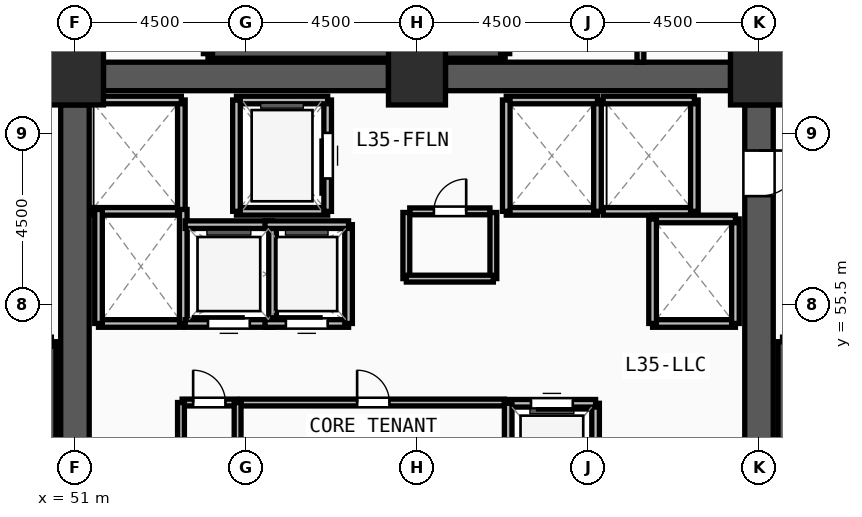
"""IFC4 building model, lengths in metres.
Left out: names, types, materials, properties, quantities, classifications, styles, units other than length and angle.
Written with IfcOpenShell. Run it as: python <this file> out.ifc"""

import sys

from ifc_helpers import new_model, si_unit, direction, frame, frame_2d, origin, origin_2d, place, context, subcontext, project, spatial, rectangle, extrude, source, transform, mapped, element, fill, save


model = new_model("IFC4")
c1 = context("Model", 3, precision=1e-05, world=origin(), true_north=direction((0.0, 1.0)))
c2 = subcontext(c1, "Body", "Model", "MODEL_VIEW")
j1 = project(units=[si_unit("LENGTHUNIT", "METRE"), si_unit("PLANEANGLEUNIT", "RADIAN")], contexts=[c1])
p1 = place(None, origin())
s1 = spatial("IfcSite", under=j1, at=p1, CompositionType="ELEMENT")
p2 = place(p1, origin())
s2 = spatial("IfcBuilding", under=s1, at=p2, CompositionType="ELEMENT")
p3 = place(p2, frame((0.0, 0.0, 135.75)))
s3 = spatial("IfcBuildingStorey", under=s2, at=p3, CompositionType="ELEMENT", Elevation=135.75)
m1 = source(origin(), c2, "Body", "SweptSolid", [
    extrude(rectangle(XDim=1.5, YDim=1.5, at=origin_2d()), origin(), (0.0, 0.0, 1.0), 3.75),
])
for number, where, z_axis, x_axis in (
    (1, (69.0, 61.5, 0.0), (0.0, 0.0, 1.0), (1.0, 0.0, 0.0)),
    (2, (60.0, 61.5, 0.0), (0.0, 0.0, 1.0), (1.0, 0.0, 0.0)),
    (3, (51.0, 61.5, 0.0), (0.0, 0.0, 1.0), (1.0, 0.0, 0.0)),
):
    element("IfcColumn", number, at=place(p3, frame(where, z_axis=z_axis, x_axis=x_axis)), inside=s3, PredefinedType="COLUMN", context=c2, shape_type="MappedRepresentation", body=[
        mapped(m1, transform((0.0, 0.0, 0.0), x_axis=(1.0, 0.0, 0.0), y_axis=(0.0, 1.0, 0.0), z_axis=(0.0, 0.0, 1.0), scale=1.0)),
    ])
for number, where, z_axis, x_axis in (
    (4, (51.75, 61.5, 0.0), (0.0, 0.0, 1.0), (1.0, 0.0, 0.0)),
    (5, (60.75, 61.5, 0.0), (0.0, 0.0, 1.0), (1.0, 0.0, 0.0)),
):
    element("IfcWall", number, at=place(p3, frame(where, z_axis=z_axis, x_axis=x_axis)), inside=s3, PredefinedType="SHEAR", context=c2, shape_type="SweptSolid", body=[
        extrude(rectangle(XDim=7.5, YDim=0.75, at=frame_2d((3.75, 0.0))), origin(), (0.0, 0.0, 1.0), 3.47),
    ])
p4 = place(p3, frame((69.0, 60.75, 0.0), z_axis=(0.0, 0.0, 1.0), x_axis=(0.0, -1.0, 0.0)))
e6 = element("IfcWall", 6, at=p4, inside=s3, PredefinedType="SHEAR", context=c2, shape_type="SweptSolid", body=[
    extrude(rectangle(XDim=13.5, YDim=0.75, at=frame_2d((6.75, 0.0))), origin(), (0.0, 0.0, 1.0), 3.47),
])
m2 = source(origin(), c2, "Body", "SweptSolid", [
    extrude(rectangle(XDim=1.2, YDim=2.2, at=frame_2d((0.6, 1.1))), frame((0.0, 0.385, 0.0), z_axis=(0.0, -1.0, 0.0), x_axis=(1.0, 0.0, 0.0)), (0.0, 0.0, 1.0), 0.77),
])
p5 = place(p4, frame((1.2, 0.0, 0.0)))
e7 = element("IfcOpeningElement", 7, at=p5, cuts=e6, PredefinedType="OPENING", context=c2, shape_type="MappedRepresentation", body=[
    mapped(m2, transform((0.0, 0.0, 0.0), x_axis=(1.0, 0.0, 0.0), y_axis=(0.0, 1.0, 0.0), z_axis=(0.0, 0.0, 1.0), scale=1.0)),
])
p6 = place(p3, frame((51.0, 47.25, 0.0), z_axis=(0.0, 0.0, 1.0), x_axis=(0.0, 1.0, 0.0)))
e8 = element("IfcWall", 8, at=p6, inside=s3, PredefinedType="SHEAR", context=c2, shape_type="SweptSolid", body=[
    extrude(rectangle(XDim=13.5, YDim=0.75, at=frame_2d((6.75, 0.0))), origin(), (0.0, 0.0, 1.0), 3.47),
])
for number, where, z_axis, x_axis in (
    (9, (50.38, 46.7, 0.0), (0.0, 0.0, 1.0), (0.0, 1.0, 0.0)),
    (10, (69.62, 54.52, 0.0), (0.0, 0.0, 1.0), (0.0, -1.0, 0.0)),
    (11, (54.5, 62.1, 0.0), (0.0, 0.0, 1.0), (1.0, 0.0, 0.0)),
):
    element("IfcWall", number, at=place(p3, frame(where, z_axis=z_axis, x_axis=x_axis)), inside=s3, PredefinedType="SOLIDWALL", context=c2, shape_type="SweptSolid", body=[
        extrude(rectangle(XDim=7.82, YDim=0.24, at=frame_2d((3.91, 0.0))), origin(), (0.0, 0.0, 1.0), 3.47),
    ])
for number, where, z_axis, x_axis in (
    (12, (62.32, 62.1, 0.0), (0.0, 0.0, 1.0), (0.0, 1.0, 0.0)),
    (13, (54.5, 65.54, 0.0), (0.0, 0.0, 1.0), (0.0, -1.0, 0.0)),
):
    element("IfcWall", number, at=place(p3, frame(where, z_axis=z_axis, x_axis=x_axis)), inside=s3, PredefinedType="SOLIDWALL", context=c2, shape_type="SweptSolid", body=[
        extrude(rectangle(XDim=3.44, YDim=0.24, at=frame_2d((1.72, 0.0))), origin(), (0.0, 0.0, 1.0), 3.47),
    ])
p7 = place(p3, frame((55.25, 57.95, 0.0), z_axis=(0.0, 0.0, 1.0), x_axis=(1.0, 0.0, 0.0)))
e14 = element("IfcWall", 14, at=p7, inside=s3, PredefinedType="SOLIDWALL", context=c2, shape_type="SweptSolid", body=[
    extrude(rectangle(XDim=2.4, YDim=0.2, at=frame_2d((1.2, 0.0))), origin(), (0.0, 0.0, 1.0), 3.47),
])
p8 = place(p3, frame((57.65, 57.95, 0.0), z_axis=(0.0, 0.0, 1.0), x_axis=(0.0, 1.0, 0.0)))
e15 = element("IfcWall", 15, at=p8, inside=s3, PredefinedType="SOLIDWALL", context=c2, shape_type="SweptSolid", body=[
    extrude(rectangle(XDim=2.93, YDim=0.2, at=frame_2d((1.465, 0.0))), origin(), (0.0, 0.0, 1.0), 3.47),
])
m3 = source(origin(), c2, "Body", "SweptSolid", [
    extrude(rectangle(XDim=1.2, YDim=2.3, at=frame_2d((0.6, 1.15))), frame((0.0, 0.11, 0.0), z_axis=(0.0, -1.0, 0.0), x_axis=(1.0, 0.0, 0.0)), (0.0, 0.0, 1.0), 0.22),
])
p9 = place(p8, frame((0.865, 0.0, 0.0)))
e16 = element("IfcOpeningElement", 16, at=p9, cuts=e15, PredefinedType="OPENING", context=c2, shape_type="MappedRepresentation", body=[
    mapped(m3, transform((0.0, 0.0, 0.0), x_axis=(1.0, 0.0, 0.0), y_axis=(0.0, 1.0, 0.0), z_axis=(0.0, 0.0, 1.0), scale=1.0)),
])
p10 = place(p3, frame((57.65, 60.88, 0.0), z_axis=(0.0, 0.0, 1.0), x_axis=(-1.0, 0.0, 0.0)))
e17 = element("IfcWall", 17, at=p10, inside=s3, PredefinedType="SOLIDWALL", context=c2, shape_type="SweptSolid", body=[
    extrude(rectangle(XDim=2.4, YDim=0.2, at=frame_2d((1.2, 0.0))), origin(), (0.0, 0.0, 1.0), 3.47),
])
p11 = place(p3, frame((55.25, 60.88, 0.0), z_axis=(0.0, 0.0, 1.0), x_axis=(0.0, -1.0, 0.0)))
e18 = element("IfcWall", 18, at=p11, inside=s3, PredefinedType="SOLIDWALL", context=c2, shape_type="SweptSolid", body=[
    extrude(rectangle(XDim=2.93, YDim=0.2, at=frame_2d((1.465, 0.0))), origin(), (0.0, 0.0, 1.0), 3.47),
])
p12 = place(p3, frame((62.35, 57.95, 0.0), z_axis=(0.0, 0.0, 1.0), x_axis=(1.0, 0.0, 0.0)))
e19 = element("IfcWall", 19, at=p12, inside=s3, PredefinedType="SOLIDWALL", context=c2, shape_type="SweptSolid", body=[
    extrude(rectangle(XDim=2.4, YDim=0.2, at=frame_2d((1.2, 0.0))), origin(), (0.0, 0.0, 1.0), 3.47),
])
p13 = place(p3, frame((64.75, 57.95, 0.0), z_axis=(0.0, 0.0, 1.0), x_axis=(0.0, 1.0, 0.0)))
e20 = element("IfcWall", 20, at=p13, inside=s3, PredefinedType="SOLIDWALL", context=c2, shape_type="SweptSolid", body=[
    extrude(rectangle(XDim=2.93, YDim=0.2, at=frame_2d((1.465, 0.0))), origin(), (0.0, 0.0, 1.0), 3.47),
])
p14 = place(p3, frame((64.75, 60.88, 0.0), z_axis=(0.0, 0.0, 1.0), x_axis=(-1.0, 0.0, 0.0)))
e21 = element("IfcWall", 21, at=p14, inside=s3, PredefinedType="SOLIDWALL", context=c2, shape_type="SweptSolid", body=[
    extrude(rectangle(XDim=2.4, YDim=0.2, at=frame_2d((1.2, 0.0))), origin(), (0.0, 0.0, 1.0), 3.47),
])
p15 = place(p3, frame((62.35, 60.88, 0.0), z_axis=(0.0, 0.0, 1.0), x_axis=(0.0, -1.0, 0.0)))
e22 = element("IfcWall", 22, at=p15, inside=s3, PredefinedType="SOLIDWALL", context=c2, shape_type="SweptSolid", body=[
    extrude(rectangle(XDim=2.93, YDim=0.2, at=frame_2d((1.465, 0.0))), origin(), (0.0, 0.0, 1.0), 3.47),
])
p16 = place(p3, frame((64.9, 57.95, 0.0), z_axis=(0.0, 0.0, 1.0), x_axis=(1.0, 0.0, 0.0)))
e23 = element("IfcWall", 23, at=p16, inside=s3, PredefinedType="SOLIDWALL", context=c2, shape_type="SweptSolid", body=[
    extrude(rectangle(XDim=2.4, YDim=0.2, at=frame_2d((1.2, 0.0))), origin(), (0.0, 0.0, 1.0), 3.47),
])
p17 = place(p3, frame((67.3, 57.95, 0.0), z_axis=(0.0, 0.0, 1.0), x_axis=(0.0, 1.0, 0.0)))
e24 = element("IfcWall", 24, at=p17, inside=s3, PredefinedType="SOLIDWALL", context=c2, shape_type="SweptSolid", body=[
    extrude(rectangle(XDim=2.93, YDim=0.2, at=frame_2d((1.465, 0.0))), origin(), (0.0, 0.0, 1.0), 3.47),
])
for number, where, z_axis, x_axis in (
    (25, (67.3, 60.88, 0.0), (0.0, 0.0, 1.0), (-1.0, 0.0, 0.0)),
    (26, (51.4, 57.95, 0.0), (0.0, 0.0, 1.0), (1.0, 0.0, 0.0)),
):
    element("IfcWall", number, at=place(p3, frame(where, z_axis=z_axis, x_axis=x_axis)), inside=s3, PredefinedType="SOLIDWALL", context=c2, shape_type="SweptSolid", body=[
        extrude(rectangle(XDim=2.4, YDim=0.2, at=frame_2d((1.2, 0.0))), origin(), (0.0, 0.0, 1.0), 3.47),
    ])
p18 = place(p3, frame((53.8, 57.95, 0.0), z_axis=(0.0, 0.0, 1.0), x_axis=(0.0, 1.0, 0.0)))
e27 = element("IfcWall", 27, at=p18, inside=s3, PredefinedType="SOLIDWALL", context=c2, shape_type="SweptSolid", body=[
    extrude(rectangle(XDim=2.93, YDim=0.2, at=frame_2d((1.465, 0.0))), origin(), (0.0, 0.0, 1.0), 3.47),
])
p19 = place(p3, frame((53.8, 60.88, 0.0), z_axis=(0.0, 0.0, 1.0), x_axis=(-1.0, 0.0, 0.0)))
e28 = element("IfcWall", 28, at=p19, inside=s3, PredefinedType="SOLIDWALL", context=c2, shape_type="SweptSolid", body=[
    extrude(rectangle(XDim=2.4, YDim=0.2, at=frame_2d((1.2, 0.0))), origin(), (0.0, 0.0, 1.0), 3.47),
])
p20 = place(p3, frame((51.62, 55.0, 0.0), z_axis=(0.0, 0.0, 1.0), x_axis=(1.0, 0.0, 0.0)))
e29 = element("IfcWall", 29, at=p20, inside=s3, PredefinedType="SOLIDWALL", context=c2, shape_type="SweptSolid", body=[
    extrude(rectangle(XDim=2.23, YDim=0.2, at=frame_2d((1.115, 0.0))), origin(), (0.0, 0.0, 1.0), 3.47),
])
for number, where, z_axis, x_axis in (
    (30, (53.85, 55.0, 0.0), (0.0, 0.0, 1.0), (0.0, 1.0, 0.0)),
    (31, (51.62, 58.0, 0.0), (0.0, 0.0, 1.0), (0.0, -1.0, 0.0)),
):
    element("IfcWall", number, at=place(p3, frame(where, z_axis=z_axis, x_axis=x_axis)), inside=s3, PredefinedType="SOLIDWALL", context=c2, shape_type="SweptSolid", body=[
        extrude(rectangle(XDim=3.0, YDim=0.2, at=frame_2d((1.5, 0.0))), origin(), (0.0, 0.0, 1.0), 3.47),
    ])
p21 = place(p3, frame((66.2, 55.0, 0.0), z_axis=(0.0, 0.0, 1.0), x_axis=(1.0, 0.0, 0.0)))
e32 = element("IfcWall", 32, at=p21, inside=s3, PredefinedType="SOLIDWALL", context=c2, shape_type="SweptSolid", body=[
    extrude(rectangle(XDim=2.18, YDim=0.2, at=frame_2d((1.09, 0.0))), origin(), (0.0, 0.0, 1.0), 3.47),
])
p22 = place(p3, frame((68.38, 55.0, 0.0), z_axis=(0.0, 0.0, 1.0), x_axis=(0.0, 1.0, 0.0)))
e33 = element("IfcWall", 33, at=p22, inside=s3, PredefinedType="SOLIDWALL", context=c2, shape_type="SweptSolid", body=[
    extrude(rectangle(XDim=2.75, YDim=0.2, at=frame_2d((1.375, 0.0))), origin(), (0.0, 0.0, 1.0), 3.47),
])
p23 = place(p3, frame((68.38, 57.75, 0.0), z_axis=(0.0, 0.0, 1.0), x_axis=(-1.0, 0.0, 0.0)))
e34 = element("IfcWall", 34, at=p23, inside=s3, PredefinedType="SOLIDWALL", context=c2, shape_type="SweptSolid", body=[
    extrude(rectangle(XDim=2.18, YDim=0.2, at=frame_2d((1.09, 0.0))), origin(), (0.0, 0.0, 1.0), 3.47),
])
p24 = place(p3, frame((66.2, 57.75, 0.0), z_axis=(0.0, 0.0, 1.0), x_axis=(0.0, -1.0, 0.0)))
e35 = element("IfcWall", 35, at=p24, inside=s3, PredefinedType="SOLIDWALL", context=c2, shape_type="SweptSolid", body=[
    extrude(rectangle(XDim=2.75, YDim=0.2, at=frame_2d((1.375, 0.0))), origin(), (0.0, 0.0, 1.0), 3.47),
])
p25 = place(p3, frame((64.7, 50.3, 0.0), z_axis=(0.0, 0.0, 1.0), x_axis=(0.0, 1.0, 0.0)))
e36 = element("IfcWall", 36, at=p25, inside=s3, PredefinedType="SOLIDWALL", context=c2, shape_type="SweptSolid", body=[
    extrude(rectangle(XDim=2.6, YDim=0.2, at=frame_2d((1.3, 0.0))), origin(), (0.0, 0.0, 1.0), 3.47),
])
p26 = place(p3, frame((64.7, 52.9, 0.0), z_axis=(0.0, 0.0, 1.0), x_axis=(-1.0, 0.0, 0.0)))
e37 = element("IfcWall", 37, at=p26, inside=s3, PredefinedType="SOLIDWALL", context=c2, shape_type="SweptSolid", body=[
    extrude(rectangle(XDim=2.3, YDim=0.2, at=frame_2d((1.15, 0.0))), origin(), (0.0, 0.0, 1.0), 3.47),
])
m4 = source(origin(), c2, "Body", "SweptSolid", [
    extrude(rectangle(XDim=1.1, YDim=2.2, at=frame_2d((0.55, 1.1))), frame((0.0, 0.11, 0.0), z_axis=(0.0, -1.0, 0.0), x_axis=(1.0, 0.0, 0.0)), (0.0, 0.0, 1.0), 0.22),
])
p27 = place(p26, frame((0.6, 0.0, 0.0)))
e38 = element("IfcOpeningElement", 38, at=p27, cuts=e37, PredefinedType="OPENING", context=c2, shape_type="MappedRepresentation", body=[
    mapped(m4, transform((0.0, 0.0, 0.0), x_axis=(1.0, 0.0, 0.0), y_axis=(0.0, 1.0, 0.0), z_axis=(0.0, 0.0, 1.0), scale=1.0)),
])
p28 = place(p3, frame((62.4, 52.9, 0.0), z_axis=(0.0, 0.0, 1.0), x_axis=(0.0, -1.0, 0.0)))
e39 = element("IfcWall", 39, at=p28, inside=s3, PredefinedType="SOLIDWALL", context=c2, shape_type="SweptSolid", body=[
    extrude(rectangle(XDim=2.6, YDim=0.2, at=frame_2d((1.3, 0.0))), origin(), (0.0, 0.0, 1.0), 3.47),
])
p29 = place(p3, frame((53.9, 55.0, 0.0), z_axis=(0.0, 0.0, 1.0), x_axis=(1.0, 0.0, 0.0)))
e40 = element("IfcWall", 40, at=p29, inside=s3, PredefinedType="SOLIDWALL", context=c2, shape_type="SweptSolid", body=[
    extrude(rectangle(XDim=2.3, YDim=0.2, at=frame_2d((1.15, 0.0))), origin(), (0.0, 0.0, 1.0), 3.47),
])
p30 = place(p29, frame((0.6, 0.0, 0.0)))
e41 = element("IfcOpeningElement", 41, at=p30, cuts=e40, PredefinedType="OPENING", context=c2, shape_type="MappedRepresentation", body=[
    mapped(m4, transform((0.0, 0.0, 0.0), x_axis=(1.0, 0.0, 0.0), y_axis=(0.0, 1.0, 0.0), z_axis=(0.0, 0.0, 1.0), scale=1.0)),
])
p31 = place(p3, frame((56.2, 55.0, 0.0), z_axis=(0.0, 0.0, 1.0), x_axis=(0.0, 1.0, 0.0)))
e42 = element("IfcWall", 42, at=p31, inside=s3, PredefinedType="SOLIDWALL", context=c2, shape_type="SweptSolid", body=[
    extrude(rectangle(XDim=2.6, YDim=0.2, at=frame_2d((1.3, 0.0))), origin(), (0.0, 0.0, 1.0), 3.47),
])
p32 = place(p3, frame((56.2, 57.6, 0.0), z_axis=(0.0, 0.0, 1.0), x_axis=(-1.0, 0.0, 0.0)))
e43 = element("IfcWall", 43, at=p32, inside=s3, PredefinedType="SOLIDWALL", context=c2, shape_type="SweptSolid", body=[
    extrude(rectangle(XDim=2.3, YDim=0.2, at=frame_2d((1.15, 0.0))), origin(), (0.0, 0.0, 1.0), 3.47),
])
p33 = place(p3, frame((56.0, 55.0, 0.0), z_axis=(0.0, 0.0, 1.0), x_axis=(1.0, 0.0, 0.0)))
e44 = element("IfcWall", 44, at=p33, inside=s3, PredefinedType="SOLIDWALL", context=c2, shape_type="SweptSolid", body=[
    extrude(rectangle(XDim=2.2, YDim=0.2, at=frame_2d((1.1, 0.0))), origin(), (0.0, 0.0, 1.0), 3.47),
])
p34 = place(p33, frame((0.55, 0.0, 0.0)))
e45 = element("IfcOpeningElement", 45, at=p34, cuts=e44, PredefinedType="OPENING", context=c2, shape_type="MappedRepresentation", body=[
    mapped(m4, transform((0.0, 0.0, 0.0), x_axis=(1.0, 0.0, 0.0), y_axis=(0.0, 1.0, 0.0), z_axis=(0.0, 0.0, 1.0), scale=1.0)),
])
p35 = place(p3, frame((58.2, 55.0, 0.0), z_axis=(0.0, 0.0, 1.0), x_axis=(0.0, 1.0, 0.0)))
e46 = element("IfcWall", 46, at=p35, inside=s3, PredefinedType="SOLIDWALL", context=c2, shape_type="SweptSolid", body=[
    extrude(rectangle(XDim=2.6, YDim=0.2, at=frame_2d((1.3, 0.0))), origin(), (0.0, 0.0, 1.0), 3.47),
])
p36 = place(p3, frame((58.2, 57.6, 0.0), z_axis=(0.0, 0.0, 1.0), x_axis=(-1.0, 0.0, 0.0)))
e47 = element("IfcWall", 47, at=p36, inside=s3, PredefinedType="SOLIDWALL", context=c2, shape_type="SweptSolid", body=[
    extrude(rectangle(XDim=2.2, YDim=0.2, at=frame_2d((1.1, 0.0))), origin(), (0.0, 0.0, 1.0), 3.47),
])
p37 = place(p3, frame((55.37, 52.92, 0.0), z_axis=(0.0, 0.0, 1.0), x_axis=(1.0, 0.0, 0.0)))
e48 = element("IfcWall", 48, at=p37, inside=s3, PredefinedType="PARTITIONING", context=c2, shape_type="SweptSolid", body=[
    extrude(rectangle(XDim=6.93, YDim=0.18, at=frame_2d((3.465, 0.0))), origin(), (0.0, 0.0, 1.0), 3.47),
])
m5 = source(origin(), c2, "Body", "SweptSolid", [
    extrude(rectangle(XDim=0.85, YDim=2.1, at=frame_2d((0.425, 1.05))), frame((0.0, 0.1, 0.0), z_axis=(0.0, -1.0, 0.0), x_axis=(1.0, 0.0, 0.0)), (0.0, 0.0, 1.0), 0.2),
])
p38 = place(p37, frame((3.055, 0.0, 0.0)))
e49 = element("IfcOpeningElement", 49, at=p38, cuts=e48, PredefinedType="OPENING", context=c2, shape_type="MappedRepresentation", body=[
    mapped(m5, transform((0.0, 0.0, 0.0), x_axis=(1.0, 0.0, 0.0), y_axis=(0.0, 1.0, 0.0), z_axis=(0.0, 0.0, 1.0), scale=1.0)),
])
p39 = place(p3, frame((59.81, 57.95, 0.0), z_axis=(0.0, 0.0, 1.0), x_axis=(1.0, 0.0, 0.0)))
e50 = element("IfcWall", 50, at=p39, inside=s3, PredefinedType="PARTITIONING", context=c2, shape_type="SweptSolid", body=[
    extrude(rectangle(XDim=2.11, YDim=0.18, at=frame_2d((1.055, 0.0))), origin(), (0.0, 0.0, 1.0), 3.47),
])
p40 = place(p39, frame((0.635, 0.0, 0.0)))
e51 = element("IfcOpeningElement", 51, at=p40, cuts=e50, PredefinedType="OPENING", context=c2, shape_type="MappedRepresentation", body=[
    mapped(m5, transform((0.0, 0.0, 0.0), x_axis=(1.0, 0.0, 0.0), y_axis=(0.0, 1.0, 0.0), z_axis=(0.0, 0.0, 1.0), scale=1.0)),
])
p41 = place(p3, frame((53.82, 52.92, 0.0), z_axis=(0.0, 0.0, 1.0), x_axis=(1.0, 0.0, 0.0)))
e52 = element("IfcWall", 52, at=p41, inside=s3, PredefinedType="PARTITIONING", context=c2, shape_type="SweptSolid", body=[
    extrude(rectangle(XDim=1.43, YDim=0.18, at=frame_2d((0.715, 0.0))), origin(), (0.0, 0.0, 1.0), 3.47),
])
p42 = place(p41, frame((0.29, 0.0, 0.0)))
e53 = element("IfcOpeningElement", 53, at=p42, cuts=e52, PredefinedType="OPENING", context=c2, shape_type="MappedRepresentation", body=[
    mapped(m5, transform((0.0, 0.0, 0.0), x_axis=(1.0, 0.0, 0.0), y_axis=(0.0, 1.0, 0.0), z_axis=(0.0, 0.0, 1.0), scale=1.0)),
])
for number, where, z_axis, x_axis in (
    (54, (59.72, 56.18, 0.0), (0.0, 0.0, 1.0), (0.0, 1.0, 0.0)),
    (55, (62.01, 56.18, 0.0), (0.0, 0.0, 1.0), (0.0, 1.0, 0.0)),
):
    element("IfcWall", number, at=place(p3, frame(where, z_axis=z_axis, x_axis=x_axis)), inside=s3, PredefinedType="PARTITIONING", context=c2, shape_type="SweptSolid", body=[
        extrude(rectangle(XDim=1.74, YDim=0.18, at=frame_2d((0.87, 0.0))), origin(), (0.0, 0.0, 1.0), 3.47),
    ])
p43 = place(p3, frame((59.72, 56.18, 0.0), z_axis=(0.0, 0.0, 1.0), x_axis=(1.0, 0.0, 0.0)))
e56 = element("IfcWall", 56, at=p43, inside=s3, PredefinedType="PARTITIONING", context=c2, shape_type="SweptSolid", body=[
    extrude(rectangle(XDim=2.29, YDim=0.18, at=frame_2d((1.145, 0.0))), origin(), (0.0, 0.0, 1.0), 3.47),
])
for number, where, z_axis, x_axis in (
    (57, (53.79, 50.35, 0.0), (0.0, 0.0, 1.0), (0.0, 1.0, 0.0)),
    (58, (55.28, 50.35, 0.0), (0.0, 0.0, 1.0), (0.0, 1.0, 0.0)),
):
    element("IfcWall", number, at=place(p3, frame(where, z_axis=z_axis, x_axis=x_axis)), inside=s3, PredefinedType="PARTITIONING", context=c2, shape_type="SweptSolid", body=[
        extrude(rectangle(XDim=2.57, YDim=0.18, at=frame_2d((1.285, 0.0))), origin(), (0.0, 0.0, 1.0), 3.47),
    ])
p44 = place(p3, frame((65.88, 61.875, 0.0), z_axis=(0.0, 0.0, 1.0), x_axis=(0.0, 1.0, 0.0)))
e59 = element("IfcWall", 59, at=p44, inside=s3, PredefinedType="PARTITIONING", context=c2, shape_type="SweptSolid", body=[
    extrude(rectangle(XDim=3.705, YDim=0.18, at=frame_2d((1.853, 0.0))), origin(), (0.0, 0.0, 1.0), 3.47),
])
p45 = place(p3, frame((69.46, 61.95, 0.0), z_axis=(0.0, 0.0, 1.0), x_axis=(0.0, 1.0, 0.0)))
e60 = element("IfcWall", 60, at=p45, inside=s3, PredefinedType="PARTITIONING", context=c2, shape_type="SweptSolid", body=[
    extrude(rectangle(XDim=3.63, YDim=0.18, at=frame_2d((1.815, 0.0))), origin(), (0.0, 0.0, 1.0), 3.47),
])
m6 = source(origin(), c2, "Body", "SweptSolid", [
    extrude(rectangle(XDim=1.2, YDim=2.2, at=frame_2d((0.6, 1.1))), frame((0.0, 0.025, 0.0), z_axis=(0.0, -1.0, 0.0), x_axis=(1.0, 0.0, 0.0)), (0.0, 0.0, 1.0), 0.05),
])
p46 = place(p5, origin())
e61 = element("IfcDoor", 61, at=p46, inside=s3, OperationType="SINGLE_SWING_LEFT", PredefinedType="DOOR", context=c2, shape_type="MappedRepresentation", body=[
    mapped(m6, transform((0.0, 0.0, 0.0), x_axis=(1.0, 0.0, 0.0), y_axis=(0.0, 1.0, 0.0), z_axis=(0.0, 0.0, 1.0), scale=1.0)),
])
fill(e7, e61)
m7 = source(origin(), c2, "Body", "SweptSolid", [
    extrude(rectangle(XDim=1.2, YDim=2.3, at=frame_2d((0.6, 1.15))), frame((0.0, 0.025, 0.0), z_axis=(0.0, -1.0, 0.0), x_axis=(1.0, 0.0, 0.0)), (0.0, 0.0, 1.0), 0.05),
])
p47 = place(p9, origin())
e62 = element("IfcDoor", 62, at=p47, inside=s3, OperationType="SLIDING_TO_LEFT", PredefinedType="DOOR", context=c2, shape_type="MappedRepresentation", body=[
    mapped(m7, transform((0.0, 0.0, 0.0), x_axis=(1.0, 0.0, 0.0), y_axis=(0.0, 1.0, 0.0), z_axis=(0.0, 0.0, 1.0), scale=1.0)),
])
fill(e16, e62)
m8 = source(origin(), c2, "Body", "SweptSolid", [
    extrude(rectangle(XDim=1.1, YDim=2.2, at=frame_2d((0.55, 1.1))), frame((0.0, 0.025, 0.0), z_axis=(0.0, -1.0, 0.0), x_axis=(1.0, 0.0, 0.0)), (0.0, 0.0, 1.0), 0.05),
])
p48 = place(p27, origin())
e63 = element("IfcDoor", 63, at=p48, inside=s3, OperationType="SLIDING_TO_LEFT", PredefinedType="DOOR", context=c2, shape_type="MappedRepresentation", body=[
    mapped(m8, transform((0.0, 0.0, 0.0), x_axis=(1.0, 0.0, 0.0), y_axis=(0.0, 1.0, 0.0), z_axis=(0.0, 0.0, 1.0), scale=1.0)),
])
fill(e38, e63)
p49 = place(p30, origin())
e64 = element("IfcDoor", 64, at=p49, inside=s3, OperationType="SLIDING_TO_LEFT", PredefinedType="DOOR", context=c2, shape_type="MappedRepresentation", body=[
    mapped(m8, transform((0.0, 0.0, 0.0), x_axis=(1.0, 0.0, 0.0), y_axis=(0.0, 1.0, 0.0), z_axis=(0.0, 0.0, 1.0), scale=1.0)),
])
fill(e41, e64)
p50 = place(p34, origin())
e65 = element("IfcDoor", 65, at=p50, inside=s3, OperationType="SLIDING_TO_LEFT", PredefinedType="DOOR", context=c2, shape_type="MappedRepresentation", body=[
    mapped(m8, transform((0.0, 0.0, 0.0), x_axis=(1.0, 0.0, 0.0), y_axis=(0.0, 1.0, 0.0), z_axis=(0.0, 0.0, 1.0), scale=1.0)),
])
fill(e45, e65)
m9 = source(origin(), c2, "Body", "SweptSolid", [
    extrude(rectangle(XDim=0.85, YDim=2.1, at=frame_2d((0.425, 1.05))), frame((0.0, 0.025, 0.0), z_axis=(0.0, -1.0, 0.0), x_axis=(1.0, 0.0, 0.0)), (0.0, 0.0, 1.0), 0.05),
])
p51 = place(p38, origin())
e66 = element("IfcDoor", 66, at=p51, inside=s3, OperationType="SINGLE_SWING_LEFT", PredefinedType="DOOR", context=c2, shape_type="MappedRepresentation", body=[
    mapped(m9, transform((0.0, 0.0, 0.0), x_axis=(1.0, 0.0, 0.0), y_axis=(0.0, 1.0, 0.0), z_axis=(0.0, 0.0, 1.0), scale=1.0)),
])
fill(e49, e66)
p52 = place(p40, origin())
e67 = element("IfcDoor", 67, at=p52, inside=s3, OperationType="SINGLE_SWING_RIGHT", PredefinedType="DOOR", context=c2, shape_type="MappedRepresentation", body=[
    mapped(m9, transform((0.0, 0.0, 0.0), x_axis=(1.0, 0.0, 0.0), y_axis=(0.0, 1.0, 0.0), z_axis=(0.0, 0.0, 1.0), scale=1.0)),
])
fill(e51, e67)
p53 = place(p42, origin())
e68 = element("IfcDoor", 68, at=p53, inside=s3, OperationType="SINGLE_SWING_LEFT", PredefinedType="DOOR", context=c2, shape_type="MappedRepresentation", body=[
    mapped(m9, transform((0.0, 0.0, 0.0), x_axis=(1.0, 0.0, 0.0), y_axis=(0.0, 1.0, 0.0), z_axis=(0.0, 0.0, 1.0), scale=1.0)),
])
fill(e53, e68)
save(model, sys.argv[1])
